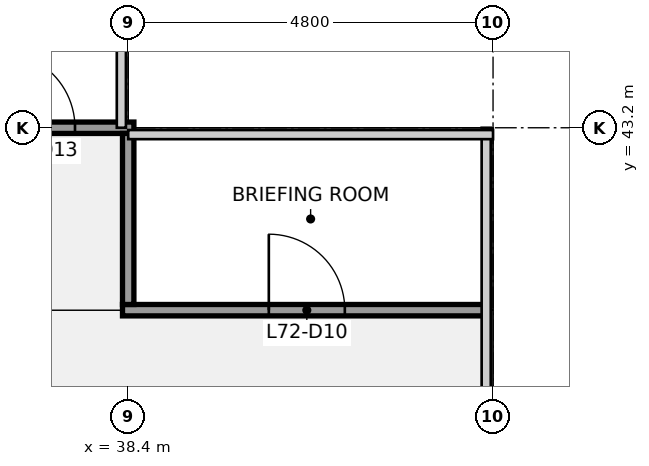
"""IFC4 building model, lengths in metres.
Left out: names, types, materials, properties, quantities, classifications, styles, units other than length and angle.
Written with IfcOpenShell. Run it as: python <this file> out.ifc"""

import sys

from ifc_helpers import new_model, si_unit, direction, frame, frame_2d, origin, place, context, subcontext, project, spatial, rectangle, extrude, element, fill, save


model = new_model("IFC4")
c1 = context("Model", 3, precision=1e-05, world=origin(), true_north=direction((0.0, 1.0)))
c2 = subcontext(c1, "Body", "Model", "MODEL_VIEW")
j1 = project(units=[si_unit("LENGTHUNIT", "METRE"), si_unit("PLANEANGLEUNIT", "RADIAN")], contexts=[c1])
p1 = place(None, origin())
s1 = spatial("IfcSite", under=j1, at=p1, CompositionType="ELEMENT")
p2 = place(p1, origin())
s2 = spatial("IfcBuilding", under=s1, at=p2, CompositionType="ELEMENT")
p3 = place(p2, frame((0.0, 0.0, 326.3)))
s3 = spatial("IfcBuildingStorey", under=s2, at=p3, CompositionType="ELEMENT", Elevation=326.3)
p4 = place(p3, frame((38.325, 40.8, 0.0), z_axis=(0.0, 0.0, 1.0), x_axis=(1.0, 0.0, 0.0)))
e1 = element("IfcWall", 1, at=p4, inside=s3, PredefinedType="PARTITIONING", context=c2, shape_type="SweptSolid", body=[
    extrude(rectangle(XDim=4.775, YDim=0.15, at=frame_2d((2.388, 0.0))), origin(), (0.0, 0.0, 1.0), 2.87),
])
p5 = place(p4, frame((1.925, 0.0, 0.0)))
e2 = element("IfcOpeningElement", 2, at=p5, cuts=e1, PredefinedType="OPENING", context=c2, shape_type="SweptSolid", body=[
    extrude(rectangle(XDim=1.0, YDim=2.1, at=frame_2d((0.5, 1.05))), frame((0.0, 0.085, 0.0), z_axis=(0.0, -1.0, 0.0), x_axis=(1.0, 0.0, 0.0)), (0.0, 0.0, 1.0), 0.17),
])
p6 = place(p3, frame((19.125, 43.2, 0.0), z_axis=(0.0, 0.0, 1.0), x_axis=(1.0, 0.0, 0.0)))
e3 = element("IfcWall", 3, at=p6, inside=s3, PredefinedType="PARTITIONING", context=c2, shape_type="SweptSolid", body=[
    extrude(rectangle(XDim=19.35, YDim=0.15, at=frame_2d((9.675, 0.0))), origin(), (0.0, 0.0, 1.0), 2.87),
])
p7 = place(p6, frame((5.575, 0.0, 0.0)))
e4 = element("IfcOpeningElement", 4, at=p7, cuts=e3, PredefinedType="OPENING", context=c2, shape_type="SweptSolid", body=[
    extrude(rectangle(XDim=1.0, YDim=2.1, at=frame_2d((0.5, 1.05))), frame((0.0, 0.085, 0.0), z_axis=(0.0, -1.0, 0.0), x_axis=(1.0, 0.0, 0.0)), (0.0, 0.0, 1.0), 0.17),
])
p8 = place(p6, frame((13.975, 0.0, 0.0)))
e5 = element("IfcOpeningElement", 5, at=p8, cuts=e3, PredefinedType="OPENING", context=c2, shape_type="SweptSolid", body=[
    extrude(rectangle(XDim=1.0, YDim=2.1, at=frame_2d((0.5, 1.05))), frame((0.0, 0.085, 0.0), z_axis=(0.0, -1.0, 0.0), x_axis=(1.0, 0.0, 0.0)), (0.0, 0.0, 1.0), 0.17),
])
p9 = place(p6, frame((17.575, 0.0, 0.0)))
e6 = element("IfcOpeningElement", 6, at=p9, cuts=e3, PredefinedType="OPENING", context=c2, shape_type="SweptSolid", body=[
    extrude(rectangle(XDim=1.0, YDim=2.1, at=frame_2d((0.5, 1.05))), frame((0.0, 0.085, 0.0), z_axis=(0.0, -1.0, 0.0), x_axis=(1.0, 0.0, 0.0)), (0.0, 0.0, 1.0), 0.17),
])
p10 = place(p3, frame((38.4, 40.875, 0.0), z_axis=(0.0, 0.0, 1.0), x_axis=(0.0, 1.0, 0.0)))
e7 = element("IfcWall", 7, at=p10, inside=s3, PredefinedType="PARTITIONING", context=c2, shape_type="SweptSolid", body=[
    extrude(rectangle(XDim=2.25, YDim=0.15, at=frame_2d((1.125, 0.0))), origin(), (0.0, 0.0, 1.0), 2.87),
])
p11 = place(p5, origin())
e8 = element("IfcDoor", 8, at=p11, inside=s3, OperationType="SINGLE_SWING_LEFT", PredefinedType="DOOR", context=c2, shape_type="SweptSolid", body=[
    extrude(rectangle(XDim=1.0, YDim=2.1, at=frame_2d((0.5, 1.05))), frame((0.0, 0.025, 0.0), z_axis=(0.0, -1.0, 0.0), x_axis=(1.0, 0.0, 0.0)), (0.0, 0.0, 1.0), 0.05),
])
fill(e2, e8)
p12 = place(p9, origin())
e9 = element("IfcDoor", 9, at=p12, inside=s3, OperationType="SINGLE_SWING_LEFT", PredefinedType="DOOR", context=c2, shape_type="SweptSolid", body=[
    extrude(rectangle(XDim=1.0, YDim=2.1, at=frame_2d((0.5, 1.05))), frame((0.0, 0.025, 0.0), z_axis=(0.0, -1.0, 0.0), x_axis=(1.0, 0.0, 0.0)), (0.0, 0.0, 1.0), 0.05),
])
fill(e6, e9)
save(model, sys.argv[1])
